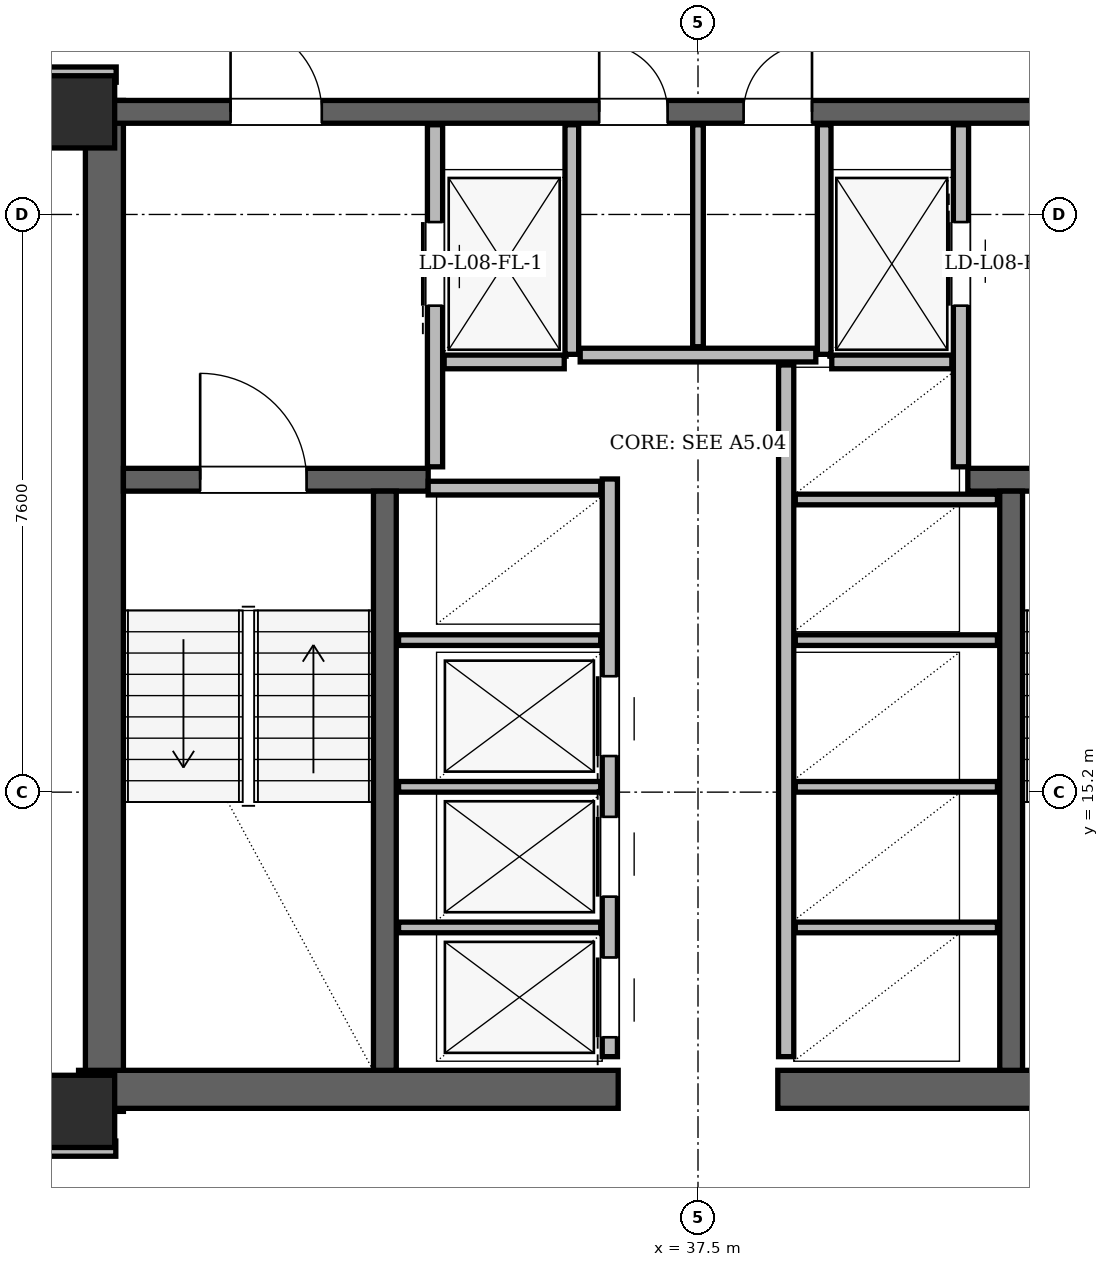
"""IFC4 building model, lengths in metres.
Left out: names, types, materials, properties, quantities, classifications, styles, units other than length and angle.
Written with IfcOpenShell. Run it as: python <this file> out.ifc"""

import sys

from ifc_helpers import new_model, si_unit, direction, frame, frame_2d, origin, origin_2d, place, context, subcontext, project, spatial, rectangle, hollow_rectangle, extrude, element, fill, save


model = new_model("IFC4")
c1 = context("Model", 3, precision=1e-05, world=origin(), true_north=direction((0.0, 1.0)))
c2 = subcontext(c1, "Body", "Model", "MODEL_VIEW")
j1 = project(units=[si_unit("LENGTHUNIT", "METRE"), si_unit("PLANEANGLEUNIT", "RADIAN")], contexts=[c1])
p1 = place(None, origin())
s1 = spatial("IfcSite", under=j1, at=p1, CompositionType="ELEMENT")
p2 = place(p1, origin())
s2 = spatial("IfcBuilding", under=s1, at=p2, CompositionType="ELEMENT")
p3 = place(p2, frame((0.0, 0.0, 34.5)))
s3 = spatial("IfcBuildingStorey", under=s2, at=p3, CompositionType="ELEMENT", Elevation=34.5)
for number, where, z_axis, x_axis in (
    (1, (29.35, 11.0, 0.0), (0.0, 0.0, 1.0), (1.0, 0.0, 0.0)),
    (2, (29.35, 24.15, 0.0), (0.0, 0.0, 1.0), (1.0, 0.0, 0.0)),
):
    element("IfcColumn", number, at=place(p3, frame(where, z_axis=z_axis, x_axis=x_axis)), inside=s3, PredefinedType="COLUMN", context=c2, shape_type="SweptSolid", body=[
        extrude(hollow_rectangle(XDim=0.95, YDim=0.95, WallThickness=0.08, at=origin_2d()), origin(), (0.0, 0.0, 1.0), 3.6),
    ])
p4 = place(p3, frame((29.69, 11.0, 0.0), z_axis=(0.0, 0.0, 1.0), x_axis=(0.0, 1.0, 0.0)))
e3 = element("IfcWall", 3, at=p4, inside=s3, PredefinedType="SHEAR", context=c2, shape_type="SweptSolid", body=[
    extrude(rectangle(XDim=13.3, YDim=0.5, at=frame_2d((6.65, 0.0))), origin(), (0.0, 0.0, 1.0), 3.36),
])
for number, where, z_axis, x_axis in (
    (4, (29.35, 11.29, 0.0), (0.0, 0.0, 1.0), (1.0, 0.0, 0.0)),
    (5, (38.55, 11.29, 0.0), (0.0, 0.0, 1.0), (1.0, 0.0, 0.0)),
):
    element("IfcWall", number, at=place(p3, frame(where, z_axis=z_axis, x_axis=x_axis)), inside=s3, PredefinedType="SHEAR", context=c2, shape_type="SweptSolid", body=[
        extrude(rectangle(XDim=7.1, YDim=0.5, at=frame_2d((3.55, 0.0))), origin(), (0.0, 0.0, 1.0), 3.36),
    ])
p5 = place(p3, frame((29.65, 24.15, 0.0), z_axis=(0.0, 0.0, 1.0), x_axis=(1.0, 0.0, 0.0)))
e6 = element("IfcWall", 6, at=p5, inside=s3, PredefinedType="SHEAR", context=c2, shape_type="SweptSolid", body=[
    extrude(rectangle(XDim=15.7, YDim=0.3, at=frame_2d((7.85, 0.0))), origin(), (0.0, 0.0, 1.0), 3.36),
])
p6 = place(p5, frame((1.7, 0.0, 0.0)))
e7 = element("IfcOpeningElement", 7, at=p6, cuts=e6, PredefinedType="OPENING", context=c2, shape_type="SweptSolid", body=[
    extrude(rectangle(XDim=1.2, YDim=2.2, at=frame_2d((0.6, 1.1))), frame((0.0, 0.15, 0.0), z_axis=(0.0, -1.0, 0.0), x_axis=(1.0, 0.0, 0.0)), (0.0, 0.0, 1.0), 0.3),
])
p7 = place(p5, frame((12.8, 0.0, 0.0)))
e8 = element("IfcOpeningElement", 8, at=p7, cuts=e6, PredefinedType="OPENING", context=c2, shape_type="SweptSolid", body=[
    extrude(rectangle(XDim=1.2, YDim=2.2, at=frame_2d((0.6, 1.1))), frame((0.0, 0.15, 0.0), z_axis=(0.0, -1.0, 0.0), x_axis=(1.0, 0.0, 0.0)), (0.0, 0.0, 1.0), 0.3),
])
p8 = place(p5, frame((6.55, 0.0, 0.0)))
e9 = element("IfcOpeningElement", 9, at=p8, cuts=e6, PredefinedType="OPENING", context=c2, shape_type="SweptSolid", body=[
    extrude(rectangle(XDim=0.9, YDim=2.05, at=frame_2d((0.45, 1.025))), frame((0.0, 0.15, 0.0), z_axis=(0.0, -1.0, 0.0), x_axis=(1.0, 0.0, 0.0)), (0.0, 0.0, 1.0), 0.3),
])
p9 = place(p5, frame((8.45, 0.0, 0.0)))
e10 = element("IfcOpeningElement", 10, at=p9, cuts=e6, PredefinedType="OPENING", context=c2, shape_type="SweptSolid", body=[
    extrude(rectangle(XDim=0.9, YDim=2.05, at=frame_2d((0.45, 1.025))), frame((0.0, 0.15, 0.0), z_axis=(0.0, -1.0, 0.0), x_axis=(1.0, 0.0, 0.0)), (0.0, 0.0, 1.0), 0.3),
])
p10 = place(p3, frame((29.94, 19.31, 0.0), z_axis=(0.0, 0.0, 1.0), x_axis=(1.0, 0.0, 0.0)))
e11 = element("IfcWall", 11, at=p10, inside=s3, PredefinedType="SHEAR", context=c2, shape_type="SweptSolid", body=[
    extrude(rectangle(XDim=4.01, YDim=0.3, at=frame_2d((2.005, 0.0))), origin(), (0.0, 0.0, 1.0), 3.36),
])
p11 = place(p10, frame((1.01, 0.0, 0.0)))
e12 = element("IfcOpeningElement", 12, at=p11, cuts=e11, PredefinedType="OPENING", context=c2, shape_type="SweptSolid", body=[
    extrude(rectangle(XDim=1.4, YDim=2.2, at=frame_2d((0.7, 1.1))), frame((0.0, 0.15, 0.0), z_axis=(0.0, -1.0, 0.0), x_axis=(1.0, 0.0, 0.0)), (0.0, 0.0, 1.0), 0.3),
])
p12 = place(p3, frame((41.05, 19.31, 0.0), z_axis=(0.0, 0.0, 1.0), x_axis=(1.0, 0.0, 0.0)))
e13 = element("IfcWall", 13, at=p12, inside=s3, PredefinedType="SHEAR", context=c2, shape_type="SweptSolid", body=[
    extrude(rectangle(XDim=4.01, YDim=0.3, at=frame_2d((2.005, 0.0))), origin(), (0.0, 0.0, 1.0), 3.36),
])
p13 = place(p12, frame((1.6, 0.0, 0.0)))
e14 = element("IfcOpeningElement", 14, at=p13, cuts=e13, PredefinedType="OPENING", context=c2, shape_type="SweptSolid", body=[
    extrude(rectangle(XDim=1.4, YDim=2.2, at=frame_2d((0.7, 1.1))), frame((0.0, 0.15, 0.0), z_axis=(0.0, -1.0, 0.0), x_axis=(1.0, 0.0, 0.0)), (0.0, 0.0, 1.0), 0.3),
])
for number, where, z_axis, x_axis in (
    (15, (33.38, 11.54, 0.0), (0.0, 0.0, 1.0), (0.0, 1.0, 0.0)),
    (16, (41.62, 11.54, 0.0), (0.0, 0.0, 1.0), (0.0, 1.0, 0.0)),
):
    element("IfcWall", number, at=place(p3, frame(where, z_axis=z_axis, x_axis=x_axis)), inside=s3, PredefinedType="SHEAR", context=c2, shape_type="SweptSolid", body=[
        extrude(rectangle(XDim=7.62, YDim=0.3, at=frame_2d((3.81, 0.0))), origin(), (0.0, 0.0, 1.0), 3.36),
    ])
p14 = place(p3, frame((29.684, 43.621, 0.0), z_axis=(0.0, 0.0, 1.0), x_axis=(-0.499999106891, -0.866025919421, 0.0)))
e17 = element("IfcWall", 17, at=p14, inside=s3, PredefinedType="SOLIDWALL", context=c2, shape_type="SweptSolid", body=[
    extrude(rectangle(XDim=32.924, YDim=0.34, at=frame_2d((16.462, 0.0))), origin(), (0.0, 0.0, 1.0), 2.494),
])
p15 = place(p14, frame((6.159, 0.0, 0.0)))
e18 = element("IfcOpeningElement", 18, at=p15, cuts=e17, PredefinedType="OPENING", context=c2, shape_type="SweptSolid", body=[
    extrude(rectangle(XDim=1.5, YDim=2.2, at=frame_2d((0.75, 1.1))), frame((0.0, 0.17, 0.0), z_axis=(0.0, -1.0, 0.0), x_axis=(1.0, 0.0, 0.0)), (0.0, 0.0, 1.0), 0.34),
])
p16 = place(p14, frame((24.019, 0.0, 0.0)))
e19 = element("IfcOpeningElement", 19, at=p16, cuts=e17, PredefinedType="OPENING", context=c2, shape_type="SweptSolid", body=[
    extrude(rectangle(XDim=1.5, YDim=2.2, at=frame_2d((0.75, 1.1))), frame((0.0, 0.17, 0.0), z_axis=(0.0, -1.0, 0.0), x_axis=(1.0, 0.0, 0.0)), (0.0, 0.0, 1.0), 0.34),
])
p17 = place(p14, frame((29.245, 0.0, 0.85)))
e20 = element("IfcOpeningElement", 20, at=p17, cuts=e17, PredefinedType="OPENING", context=c2, shape_type="SweptSolid", body=[
    extrude(rectangle(XDim=2.4, YDim=1.534, at=frame_2d((1.2, 0.767))), frame((0.0, 0.17, 0.0), z_axis=(0.0, -1.0, 0.0), x_axis=(1.0, 0.0, 0.0)), (0.0, 0.0, 1.0), 0.34),
])
p18 = place(p14, frame((10.753, 0.0, 0.85)))
e21 = element("IfcOpeningElement", 21, at=p18, cuts=e17, PredefinedType="OPENING", context=c2, shape_type="SweptSolid", body=[
    extrude(rectangle(XDim=2.5, YDim=1.534, at=frame_2d((1.25, 0.767))), frame((0.0, 0.17, 0.0), z_axis=(0.0, -1.0, 0.0), x_axis=(1.0, 0.0, 0.0)), (0.0, 0.0, 1.0), 0.34),
])
p19 = place(p14, frame((17.723, 0.0, 0.85)))
e22 = element("IfcOpeningElement", 22, at=p19, cuts=e17, PredefinedType="OPENING", context=c2, shape_type="SweptSolid", body=[
    extrude(rectangle(XDim=2.4, YDim=1.534, at=frame_2d((1.2, 0.767))), frame((0.0, 0.17, 0.0), z_axis=(0.0, -1.0, 0.0), x_axis=(1.0, 0.0, 0.0)), (0.0, 0.0, 1.0), 0.34),
])
p20 = place(p14, frame((1.538, 0.0, 0.85)))
e23 = element("IfcOpeningElement", 23, at=p20, cuts=e17, PredefinedType="OPENING", context=c2, shape_type="SweptSolid", body=[
    extrude(rectangle(XDim=1.2, YDim=1.48, at=frame_2d((0.6, 0.74))), frame((0.0, 0.17, 0.0), z_axis=(0.0, -1.0, 0.0), x_axis=(1.0, 0.0, 0.0)), (0.0, 0.0, 1.0), 0.34),
])
p21 = place(p14, frame((0.69, 0.0, 0.85)))
e24 = element("IfcOpeningElement", 24, at=p21, cuts=e17, PredefinedType="OPENING", context=c2, shape_type="SweptSolid", body=[
    extrude(rectangle(XDim=0.7, YDim=1.2, at=frame_2d((0.35, 0.6))), frame((0.0, 0.17, 0.0), z_axis=(0.0, -1.0, 0.0), x_axis=(1.0, 0.0, 0.0)), (0.0, 0.0, 1.0), 0.34),
])
p22 = place(p3, frame((34.04, 19.48, 0.0), z_axis=(0.0, 0.0, 1.0), x_axis=(0.0, 1.0, 0.0)))
e25 = element("IfcWall", 25, at=p22, inside=s3, PredefinedType="PARTITIONING", context=c2, shape_type="SweptSolid", body=[
    extrude(rectangle(XDim=4.5, YDim=0.2, at=frame_2d((2.25, 0.0))), origin(), (0.0, 0.0, 1.0), 2.4),
])
p23 = place(p22, frame((2.12, 0.0, 0.0)))
e26 = element("IfcOpeningElement", 26, at=p23, cuts=e25, PredefinedType="OPENING", context=c2, shape_type="SweptSolid", body=[
    extrude(rectangle(XDim=1.1, YDim=2.2, at=frame_2d((0.55, 1.1))), frame((0.0, 0.1, 0.0), z_axis=(0.0, -1.0, 0.0), x_axis=(1.0, 0.0, 0.0)), (0.0, 0.0, 1.0), 0.2),
])
p24 = place(p3, frame((35.84, 20.96, 0.0), z_axis=(0.0, 0.0, 1.0), x_axis=(0.0, 1.0, 0.0)))
e27 = element("IfcWall", 27, at=p24, inside=s3, PredefinedType="PARTITIONING", context=c2, shape_type="SweptSolid", body=[
    extrude(rectangle(XDim=3.02, YDim=0.18, at=frame_2d((1.51, 0.0))), origin(), (0.0, 0.0, 1.0), 2.4),
])
p25 = place(p3, frame((34.16, 20.86, 0.0), z_axis=(0.0, 0.0, 1.0), x_axis=(1.0, 0.0, 0.0)))
e28 = element("IfcWall", 28, at=p25, inside=s3, PredefinedType="PARTITIONING", context=c2, shape_type="SweptSolid", body=[
    extrude(rectangle(XDim=1.58, YDim=0.18, at=frame_2d((0.79, 0.0))), origin(), (0.0, 0.0, 1.0), 3.36),
])
p26 = place(p3, frame((40.96, 19.48, 0.0), z_axis=(0.0, 0.0, 1.0), x_axis=(0.0, 1.0, 0.0)))
e29 = element("IfcWall", 29, at=p26, inside=s3, PredefinedType="PARTITIONING", context=c2, shape_type="SweptSolid", body=[
    extrude(rectangle(XDim=4.5, YDim=0.2, at=frame_2d((2.25, 0.0))), origin(), (0.0, 0.0, 1.0), 2.4),
])
p27 = place(p26, frame((2.12, 0.0, 0.0)))
e30 = element("IfcOpeningElement", 30, at=p27, cuts=e29, PredefinedType="OPENING", context=c2, shape_type="SweptSolid", body=[
    extrude(rectangle(XDim=1.1, YDim=2.2, at=frame_2d((0.55, 1.1))), frame((0.0, 0.1, 0.0), z_axis=(0.0, -1.0, 0.0), x_axis=(1.0, 0.0, 0.0)), (0.0, 0.0, 1.0), 0.2),
])
p28 = place(p3, frame((39.16, 20.96, 0.0), z_axis=(0.0, 0.0, 1.0), x_axis=(0.0, 1.0, 0.0)))
e31 = element("IfcWall", 31, at=p28, inside=s3, PredefinedType="PARTITIONING", context=c2, shape_type="SweptSolid", body=[
    extrude(rectangle(XDim=3.02, YDim=0.18, at=frame_2d((1.51, 0.0))), origin(), (0.0, 0.0, 1.0), 2.4),
])
p29 = place(p3, frame((39.26, 20.86, 0.0), z_axis=(0.0, 0.0, 1.0), x_axis=(1.0, 0.0, 0.0)))
e32 = element("IfcWall", 32, at=p29, inside=s3, PredefinedType="PARTITIONING", context=c2, shape_type="SweptSolid", body=[
    extrude(rectangle(XDim=1.58, YDim=0.18, at=frame_2d((0.79, 0.0))), origin(), (0.0, 0.0, 1.0), 3.36),
])
p30 = place(p3, frame((36.34, 11.72, 0.0), z_axis=(0.0, 0.0, 1.0), x_axis=(0.0, 1.0, 0.0)))
e33 = element("IfcWall", 33, at=p30, inside=s3, PredefinedType="PARTITIONING", context=c2, shape_type="SweptSolid", body=[
    extrude(rectangle(XDim=7.6, YDim=0.2, at=frame_2d((3.8, 0.0))), origin(), (0.0, 0.0, 1.0), 3.36),
])
p31 = place(p30, frame((0.255, 0.0, 0.0)))
e34 = element("IfcOpeningElement", 34, at=p31, cuts=e33, PredefinedType="OPENING", context=c2, shape_type="SweptSolid", body=[
    extrude(rectangle(XDim=1.05, YDim=2.15, at=frame_2d((0.525, 1.075))), frame((0.0, 0.1, 0.0), z_axis=(0.0, -1.0, 0.0), x_axis=(1.0, 0.0, 0.0)), (0.0, 0.0, 1.0), 0.2),
])
p32 = place(p30, frame((2.105, 0.0, 0.0)))
e35 = element("IfcOpeningElement", 35, at=p32, cuts=e33, PredefinedType="OPENING", context=c2, shape_type="SweptSolid", body=[
    extrude(rectangle(XDim=1.05, YDim=2.15, at=frame_2d((0.525, 1.075))), frame((0.0, 0.1, 0.0), z_axis=(0.0, -1.0, 0.0), x_axis=(1.0, 0.0, 0.0)), (0.0, 0.0, 1.0), 0.2),
])
p33 = place(p30, frame((3.955, 0.0, 0.0)))
e36 = element("IfcOpeningElement", 36, at=p33, cuts=e33, PredefinedType="OPENING", context=c2, shape_type="SweptSolid", body=[
    extrude(rectangle(XDim=1.05, YDim=2.15, at=frame_2d((0.525, 1.075))), frame((0.0, 0.1, 0.0), z_axis=(0.0, -1.0, 0.0), x_axis=(1.0, 0.0, 0.0)), (0.0, 0.0, 1.0), 0.2),
])
p34 = place(p3, frame((33.95, 19.2, 0.0), z_axis=(0.0, 0.0, 1.0), x_axis=(1.0, 0.0, 0.0)))
e37 = element("IfcWall", 37, at=p34, inside=s3, PredefinedType="PARTITIONING", context=c2, shape_type="SweptSolid", body=[
    extrude(rectangle(XDim=2.27, YDim=0.18, at=frame_2d((1.135, 0.0))), origin(), (0.0, 0.0, 1.0), 3.36),
])
for number, where, z_axis, x_axis in (
    (38, (33.56, 13.42, 0.0), (0.0, 0.0, 1.0), (1.0, 0.0, 0.0)),
    (39, (33.56, 15.27, 0.0), (0.0, 0.0, 1.0), (1.0, 0.0, 0.0)),
    (40, (33.56, 17.2, 0.0), (0.0, 0.0, 1.0), (1.0, 0.0, 0.0)),
):
    element("IfcWall", number, at=place(p3, frame(where, z_axis=z_axis, x_axis=x_axis)), inside=s3, PredefinedType="PARTITIONING", context=c2, shape_type="SweptSolid", body=[
        extrude(rectangle(XDim=2.66, YDim=0.14, at=frame_2d((1.33, 0.0))), origin(), (0.0, 0.0, 1.0), 3.36),
    ])
p35 = place(p3, frame((38.66, 11.72, 0.0), z_axis=(0.0, 0.0, 1.0), x_axis=(0.0, 1.0, 0.0)))
e41 = element("IfcWall", 41, at=p35, inside=s3, PredefinedType="PARTITIONING", context=c2, shape_type="SweptSolid", body=[
    extrude(rectangle(XDim=9.1, YDim=0.2, at=frame_2d((4.55, 0.0))), origin(), (0.0, 0.0, 1.0), 3.36),
])
for number, where, z_axis, x_axis in (
    (42, (38.78, 13.42, 0.0), (0.0, 0.0, 1.0), (1.0, 0.0, 0.0)),
    (43, (38.78, 15.27, 0.0), (0.0, 0.0, 1.0), (1.0, 0.0, 0.0)),
    (44, (38.78, 17.2, 0.0), (0.0, 0.0, 1.0), (1.0, 0.0, 0.0)),
    (45, (38.78, 19.05, 0.0), (0.0, 0.0, 1.0), (1.0, 0.0, 0.0)),
):
    element("IfcWall", number, at=place(p3, frame(where, z_axis=z_axis, x_axis=x_axis)), inside=s3, PredefinedType="PARTITIONING", context=c2, shape_type="SweptSolid", body=[
        extrude(rectangle(XDim=2.66, YDim=0.14, at=frame_2d((1.33, 0.0))), origin(), (0.0, 0.0, 1.0), 3.36),
    ])
p36 = place(p3, frame((35.95, 20.95, 0.0), z_axis=(0.0, 0.0, 1.0), x_axis=(1.0, 0.0, 0.0)))
e46 = element("IfcWall", 46, at=p36, inside=s3, PredefinedType="PARTITIONING", context=c2, shape_type="SweptSolid", body=[
    extrude(rectangle(XDim=3.1, YDim=0.18, at=frame_2d((1.55, 0.0))), origin(), (0.0, 0.0, 1.0), 3.36),
])
p37 = place(p3, frame((37.5, 21.06, 0.0), z_axis=(0.0, 0.0, 1.0), x_axis=(0.0, 1.0, 0.0)))
e47 = element("IfcWall", 47, at=p37, inside=s3, PredefinedType="PARTITIONING", context=c2, shape_type="SweptSolid", body=[
    extrude(rectangle(XDim=2.92, YDim=0.14, at=frame_2d((1.46, 0.0))), origin(), (0.0, 0.0, 1.0), 2.4),
])
p38 = place(p3, frame((28.86, 10.51, 0.0), z_axis=(0.0, 0.0, 1.0), x_axis=(1.0, 0.0, 0.0)))
e48 = element("IfcWall", 48, at=p38, inside=s3, PredefinedType="PARTITIONING", context=c2, shape_type="SweptSolid", body=[
    extrude(rectangle(XDim=0.98, YDim=0.2, at=frame_2d((0.49, 0.0))), origin(), (0.0, 0.0, 1.0), 2.738),
])
p39 = place(p3, frame((28.855, 24.64, 0.0), z_axis=(0.0, 0.0, 1.0), x_axis=(1.0, 0.0, 0.0)))
e49 = element("IfcWall", 49, at=p39, inside=s3, PredefinedType="PARTITIONING", context=c2, shape_type="SweptSolid", body=[
    extrude(rectangle(XDim=0.99, YDim=0.2, at=frame_2d((0.495, 0.0))), origin(), (0.0, 0.0, 1.0), 2.738),
])
p40 = place(p23, origin())
e50 = element("IfcDoor", 50, at=p40, inside=s3, OperationType="SLIDING_TO_LEFT", PredefinedType="DOOR", context=c2, shape_type="SweptSolid", body=[
    extrude(rectangle(XDim=1.1, YDim=2.2, at=frame_2d((0.55, 1.1))), frame((0.0, 0.025, 0.0), z_axis=(0.0, -1.0, 0.0), x_axis=(1.0, 0.0, 0.0)), (0.0, 0.0, 1.0), 0.05),
])
fill(e26, e50)
p41 = place(p27, origin())
e51 = element("IfcDoor", 51, at=p41, inside=s3, OperationType="SLIDING_TO_RIGHT", PredefinedType="DOOR", context=c2, shape_type="SweptSolid", body=[
    extrude(rectangle(XDim=1.1, YDim=2.2, at=frame_2d((0.55, 1.1))), frame((0.0, 0.025, 0.0), z_axis=(0.0, -1.0, 0.0), x_axis=(1.0, 0.0, 0.0)), (0.0, 0.0, 1.0), 0.05),
])
fill(e30, e51)
p42 = place(p31, origin())
e52 = element("IfcDoor", 52, at=p42, inside=s3, OperationType="SLIDING_TO_LEFT", PredefinedType="DOOR", context=c2, shape_type="SweptSolid", body=[
    extrude(rectangle(XDim=1.05, YDim=2.15, at=frame_2d((0.525, 1.075))), frame((0.0, 0.025, 0.0), z_axis=(0.0, -1.0, 0.0), x_axis=(1.0, 0.0, 0.0)), (0.0, 0.0, 1.0), 0.05),
])
fill(e34, e52)
p43 = place(p32, origin())
e53 = element("IfcDoor", 53, at=p43, inside=s3, OperationType="SLIDING_TO_RIGHT", PredefinedType="DOOR", context=c2, shape_type="SweptSolid", body=[
    extrude(rectangle(XDim=1.05, YDim=2.15, at=frame_2d((0.525, 1.075))), frame((0.0, 0.025, 0.0), z_axis=(0.0, -1.0, 0.0), x_axis=(1.0, 0.0, 0.0)), (0.0, 0.0, 1.0), 0.05),
])
fill(e35, e53)
p44 = place(p33, origin())
e54 = element("IfcDoor", 54, at=p44, inside=s3, OperationType="SLIDING_TO_LEFT", PredefinedType="DOOR", context=c2, shape_type="SweptSolid", body=[
    extrude(rectangle(XDim=1.05, YDim=2.15, at=frame_2d((0.525, 1.075))), frame((0.0, 0.025, 0.0), z_axis=(0.0, -1.0, 0.0), x_axis=(1.0, 0.0, 0.0)), (0.0, 0.0, 1.0), 0.05),
])
fill(e36, e54)
p45 = place(p11, origin())
e55 = element("IfcDoor", 55, at=p45, inside=s3, OperationType="SINGLE_SWING_LEFT", PredefinedType="DOOR", context=c2, shape_type="SweptSolid", body=[
    extrude(rectangle(XDim=1.4, YDim=2.2, at=frame_2d((0.7, 1.1))), frame((0.0, 0.025, 0.0), z_axis=(0.0, -1.0, 0.0), x_axis=(1.0, 0.0, 0.0)), (0.0, 0.0, 1.0), 0.05),
])
fill(e12, e55)
p46 = place(p6, origin())
e56 = element("IfcDoor", 56, at=p46, inside=s3, OperationType="SINGLE_SWING_LEFT", PredefinedType="DOOR", context=c2, shape_type="SweptSolid", body=[
    extrude(rectangle(XDim=1.2, YDim=2.2, at=frame_2d((0.6, 1.1))), frame((0.0, 0.025, 0.0), z_axis=(0.0, -1.0, 0.0), x_axis=(1.0, 0.0, 0.0)), (0.0, 0.0, 1.0), 0.05),
])
fill(e7, e56)
p47 = place(p8, origin())
e57 = element("IfcDoor", 57, at=p47, inside=s3, OperationType="SINGLE_SWING_LEFT", PredefinedType="DOOR", context=c2, shape_type="SweptSolid", body=[
    extrude(rectangle(XDim=0.9, YDim=2.05, at=frame_2d((0.45, 1.025))), frame((0.0, 0.025, 0.0), z_axis=(0.0, -1.0, 0.0), x_axis=(1.0, 0.0, 0.0)), (0.0, 0.0, 1.0), 0.05),
])
fill(e9, e57)
p48 = place(p9, origin())
e58 = element("IfcDoor", 58, at=p48, inside=s3, OperationType="SINGLE_SWING_RIGHT", PredefinedType="DOOR", context=c2, shape_type="SweptSolid", body=[
    extrude(rectangle(XDim=0.9, YDim=2.05, at=frame_2d((0.45, 1.025))), frame((0.0, 0.025, 0.0), z_axis=(0.0, -1.0, 0.0), x_axis=(1.0, 0.0, 0.0)), (0.0, 0.0, 1.0), 0.05),
])
fill(e10, e58)
save(model, sys.argv[1])
